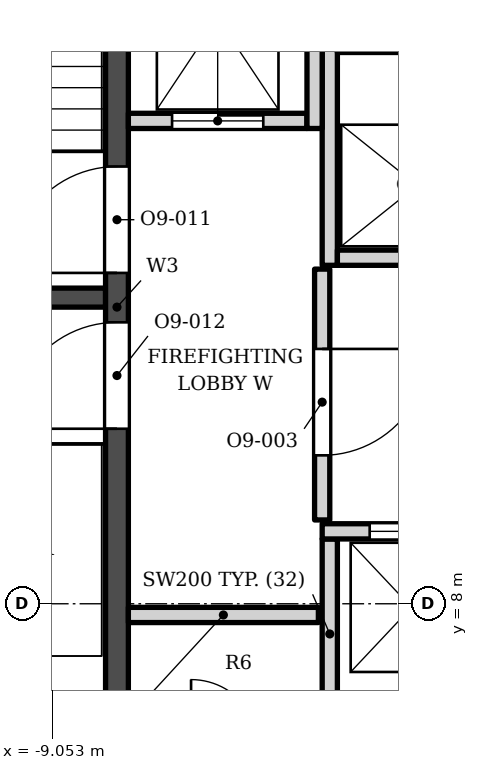
"""IFC4 building model, lengths in metres.
Left out: names, types, materials, properties, quantities, classifications, styles, units other than length and angle.
Written with IfcOpenShell. Run it as: python <this file> out.ifc"""

import sys

from ifc_helpers import new_model, si_unit, direction, frame, frame_2d, origin, place, context, subcontext, project, spatial, rectangle, extrude, element, fill, save


model = new_model("IFC4")
c1 = context("Model", 3, precision=1e-05, world=origin(), true_north=direction((0.0, 1.0)))
c2 = subcontext(c1, "Body", "Model", "MODEL_VIEW")
j1 = project(units=[si_unit("LENGTHUNIT", "METRE"), si_unit("PLANEANGLEUNIT", "RADIAN")], contexts=[c1])
p1 = place(None, origin())
s1 = spatial("IfcSite", under=j1, at=p1, CompositionType="ELEMENT")
p2 = place(p1, origin())
s2 = spatial("IfcBuilding", under=s1, at=p2, CompositionType="ELEMENT")
p3 = place(p2, frame((0.0, 0.0, 248.2)))
s3 = spatial("IfcBuildingStorey", under=s2, at=p3, CompositionType="ELEMENT", Elevation=248.2)
p4 = place(p3, frame((-8.2, 5.253, 0.0), z_axis=(0.0, 0.0, 1.0), x_axis=(0.0, 1.0, 0.0)))
e1 = element("IfcWall", 1, at=p4, inside=s3, PredefinedType="SHEAR", context=c2, shape_type="SweptSolid", body=[
    extrude(rectangle(XDim=13.3, YDim=0.3, at=frame_2d((6.65, 0.0))), origin(), (0.0, 0.0, 1.0), 3.9),
])
p5 = place(p4, frame((7.1, 0.0, 0.0)))
e2 = element("IfcOpeningElement", 2, at=p5, cuts=e1, PredefinedType="OPENING", context=c2, shape_type="SweptSolid", body=[
    extrude(rectangle(XDim=1.4, YDim=2.1, at=frame_2d((0.7, 1.05))), frame((0.0, 0.16, 0.0), z_axis=(0.0, -1.0, 0.0), x_axis=(1.0, 0.0, 0.0)), (0.0, 0.0, 1.0), 0.32),
])
p6 = place(p4, frame((5.05, 0.0, 0.0)))
e3 = element("IfcOpeningElement", 3, at=p6, cuts=e1, PredefinedType="OPENING", context=c2, shape_type="SweptSolid", body=[
    extrude(rectangle(XDim=1.4, YDim=2.1, at=frame_2d((0.7, 1.05))), frame((0.0, 0.16, 0.0), z_axis=(0.0, -1.0, 0.0), x_axis=(1.0, 0.0, 0.0)), (0.0, 0.0, 1.0), 0.32),
])
p7 = place(p3, frame((-12.1, 12.028, 0.0), z_axis=(0.0, 0.0, 1.0), x_axis=(1.0, 0.0, 0.0)))
e4 = element("IfcWall", 4, at=p7, inside=s3, PredefinedType="SHEAR", context=c2, shape_type="SweptSolid", body=[
    extrude(rectangle(XDim=3.75, YDim=0.25, at=frame_2d((1.875, 0.0))), origin(), (0.0, 0.0, 1.0), 3.9),
])
for number, where, z_axis, x_axis in (
    (5, (-5.4, 6.353, 0.0), (0.0, 0.0, 1.0), (0.0, 1.0, 0.0)),
    (6, (-8.05, 7.853, 0.0), (0.0, 0.0, 1.0), (1.0, 0.0, 0.0)),
):
    element("IfcWall", number, at=place(p3, frame(where, z_axis=z_axis, x_axis=x_axis)), inside=s3, PredefinedType="SOLIDWALL", context=c2, shape_type="SweptSolid", body=[
        extrude(rectangle(XDim=2.5, YDim=0.2, at=frame_2d((1.25, 0.0))), origin(), (0.0, 0.0, 1.0), 3.73),
    ])
p8 = place(p3, frame((-5.5, 8.953, 0.0), z_axis=(0.0, 0.0, 1.0), x_axis=(1.0, 0.0, 0.0)))
e7 = element("IfcWall", 7, at=p8, inside=s3, PredefinedType="SOLIDWALL", context=c2, shape_type="SweptSolid", body=[
    extrude(rectangle(XDim=4.5, YDim=0.2, at=frame_2d((2.25, 0.0))), origin(), (0.0, 0.0, 1.0), 3.73),
])
p9 = place(p8, frame((0.625, 0.0, 0.0)))
e8 = element("IfcOpeningElement", 8, at=p9, cuts=e7, PredefinedType="OPENING", context=c2, shape_type="SweptSolid", body=[
    extrude(rectangle(XDim=1.1, YDim=2.1, at=frame_2d((0.55, 1.05))), frame((0.0, 0.11, 0.0), z_axis=(0.0, -1.0, 0.0), x_axis=(1.0, 0.0, 0.0)), (0.0, 0.0, 1.0), 0.22),
])
p10 = place(p8, frame((2.775, 0.0, 0.0)))
e9 = element("IfcOpeningElement", 9, at=p10, cuts=e7, PredefinedType="OPENING", context=c2, shape_type="SweptSolid", body=[
    extrude(rectangle(XDim=1.1, YDim=2.1, at=frame_2d((0.55, 1.05))), frame((0.0, 0.11, 0.0), z_axis=(0.0, -1.0, 0.0), x_axis=(1.0, 0.0, 0.0)), (0.0, 0.0, 1.0), 0.22),
])
p11 = place(p3, frame((-5.5, 9.103, 0.0), z_axis=(0.0, 0.0, 1.0), x_axis=(0.0, 1.0, 0.0)))
e10 = element("IfcWall", 10, at=p11, inside=s3, PredefinedType="SOLIDWALL", context=c2, shape_type="SweptSolid", body=[
    extrude(rectangle(XDim=3.3, YDim=0.2, at=frame_2d((1.65, 0.0))), origin(), (0.0, 0.0, 1.0), 3.73),
])
p12 = place(p11, frame((0.85, 0.0, 0.0)))
e11 = element("IfcOpeningElement", 11, at=p12, cuts=e10, PredefinedType="OPENING", context=c2, shape_type="SweptSolid", body=[
    extrude(rectangle(XDim=1.4, YDim=2.1, at=frame_2d((0.7, 1.05))), frame((0.0, 0.11, 0.0), z_axis=(0.0, -1.0, 0.0), x_axis=(1.0, 0.0, 0.0)), (0.0, 0.0, 1.0), 0.22),
])
p13 = place(p3, frame((-5.4, 12.453, 0.0), z_axis=(0.0, 0.0, 1.0), x_axis=(0.0, 1.0, 0.0)))
e12 = element("IfcWall", 12, at=p13, inside=s3, PredefinedType="SOLIDWALL", context=c2, shape_type="SweptSolid", body=[
    extrude(rectangle(XDim=3.0, YDim=0.2, at=frame_2d((1.5, 0.0))), origin(), (0.0, 0.0, 1.0), 3.73),
])
p14 = place(p3, frame((-5.3, 12.552, 0.0), z_axis=(0.0, 0.0, 1.0), x_axis=(1.0, 0.0, 0.0)))
e13 = element("IfcWall", 13, at=p14, inside=s3, PredefinedType="SOLIDWALL", context=c2, shape_type="SweptSolid", body=[
    extrude(rectangle(XDim=2.1, YDim=0.2, at=frame_2d((1.05, 0.0))), origin(), (0.0, 0.0, 1.0), 3.73),
])
p15 = place(p3, frame((-8.05, 14.353, 0.0), z_axis=(0.0, 0.0, 1.0), x_axis=(1.0, 0.0, 0.0)))
e14 = element("IfcWall", 14, at=p15, inside=s3, PredefinedType="SOLIDWALL", context=c2, shape_type="SweptSolid", body=[
    extrude(rectangle(XDim=2.35, YDim=0.2, at=frame_2d((1.175, 0.0))), origin(), (0.0, 0.0, 1.0), 3.73),
])
p16 = place(p15, frame((0.575, 0.0, 0.0)))
e15 = element("IfcOpeningElement", 15, at=p16, cuts=e14, PredefinedType="OPENING", context=c2, shape_type="SweptSolid", body=[
    extrude(rectangle(XDim=1.2, YDim=2.1, at=frame_2d((0.6, 1.05))), frame((0.0, 0.11, 0.0), z_axis=(0.0, -1.0, 0.0), x_axis=(1.0, 0.0, 0.0)), (0.0, 0.0, 1.0), 0.22),
])
p17 = place(p3, frame((-5.6, 14.253, 0.0), z_axis=(0.0, 0.0, 1.0), x_axis=(0.0, 1.0, 0.0)))
e16 = element("IfcWall", 16, at=p17, inside=s3, PredefinedType="SOLIDWALL", context=c2, shape_type="SweptSolid", body=[
    extrude(rectangle(XDim=4.3, YDim=0.2, at=frame_2d((2.15, 0.0))), origin(), (0.0, 0.0, 1.0), 3.73),
])
p18 = place(p3, frame((-5.3, 15.353, 0.0), z_axis=(0.0, 0.0, 1.0), x_axis=(1.0, 0.0, 0.0)))
e17 = element("IfcWall", 17, at=p18, inside=s3, PredefinedType="SOLIDWALL", context=c2, shape_type="SweptSolid", body=[
    extrude(rectangle(XDim=2.1, YDim=0.2, at=frame_2d((1.05, 0.0))), origin(), (0.0, 0.0, 1.0), 3.73),
])
p19 = place(p9, origin())
e18 = element("IfcDoor", 18, at=p19, inside=s3, OperationType="DOUBLE_DOOR_SLIDING", PredefinedType="DOOR", context=c2, shape_type="SweptSolid", body=[
    extrude(rectangle(XDim=1.1, YDim=2.1, at=frame_2d((0.55, 1.05))), frame((0.0, 0.025, 0.0), z_axis=(0.0, -1.0, 0.0), x_axis=(1.0, 0.0, 0.0)), (0.0, 0.0, 1.0), 0.05),
])
fill(e8, e18)
p20 = place(p16, origin())
e19 = element("IfcDoor", 19, at=p20, inside=s3, OperationType="DOUBLE_DOOR_SLIDING", PredefinedType="DOOR", context=c2, shape_type="SweptSolid", body=[
    extrude(rectangle(XDim=1.2, YDim=2.1, at=frame_2d((0.6, 1.05))), frame((0.0, 0.025, 0.0), z_axis=(0.0, -1.0, 0.0), x_axis=(1.0, 0.0, 0.0)), (0.0, 0.0, 1.0), 0.05),
])
fill(e15, e19)
p21 = place(p5, origin())
e20 = element("IfcDoor", 20, at=p21, inside=s3, OperationType="SINGLE_SWING_LEFT", PredefinedType="DOOR", context=c2, shape_type="SweptSolid", body=[
    extrude(rectangle(XDim=1.4, YDim=2.1, at=frame_2d((0.7, 1.05))), frame((0.0, 0.025, 0.0), z_axis=(0.0, -1.0, 0.0), x_axis=(1.0, 0.0, 0.0)), (0.0, 0.0, 1.0), 0.05),
])
fill(e2, e20)
p22 = place(p6, origin())
e21 = element("IfcDoor", 21, at=p22, inside=s3, OperationType="SINGLE_SWING_LEFT", PredefinedType="DOOR", context=c2, shape_type="SweptSolid", body=[
    extrude(rectangle(XDim=1.4, YDim=2.1, at=frame_2d((0.7, 1.05))), frame((0.0, 0.025, 0.0), z_axis=(0.0, -1.0, 0.0), x_axis=(1.0, 0.0, 0.0)), (0.0, 0.0, 1.0), 0.05),
])
fill(e3, e21)
p23 = place(p12, origin())
e22 = element("IfcDoor", 22, at=p23, inside=s3, OperationType="SINGLE_SWING_RIGHT", PredefinedType="DOOR", context=c2, shape_type="SweptSolid", body=[
    extrude(rectangle(XDim=1.4, YDim=2.1, at=frame_2d((0.7, 1.05))), frame((0.0, 0.025, 0.0), z_axis=(0.0, -1.0, 0.0), x_axis=(1.0, 0.0, 0.0)), (0.0, 0.0, 1.0), 0.05),
])
fill(e11, e22)
save(model, sys.argv[1])
